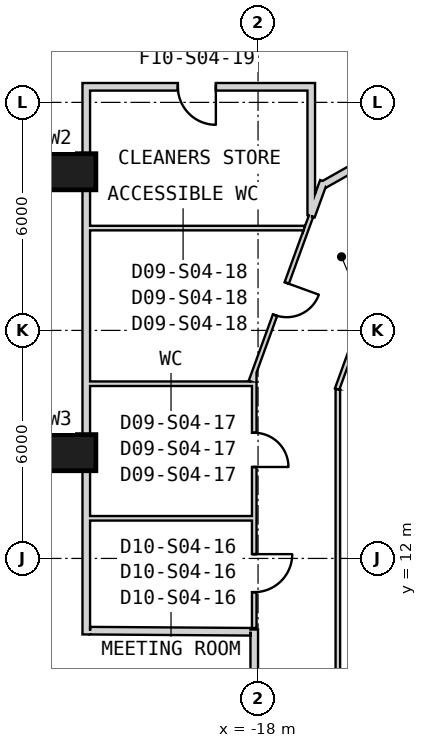
"""IFC4 building model, lengths in metres.
Left out: names, types, materials, properties, quantities, classifications, styles, units other than length and angle.
Written with IfcOpenShell. Run it as: python <this file> out.ifc"""

import sys

from ifc_helpers import new_model, si_unit, direction, frame, frame_2d, origin, origin_2d, place, context, subcontext, project, spatial, rectangle, extrude, element, fill, save


model = new_model("IFC4")
c1 = context("Model", 3, precision=1e-05, world=origin(), true_north=direction((0.0, 1.0)))
c2 = subcontext(c1, "Body", "Model", "MODEL_VIEW")
j1 = project(units=[si_unit("LENGTHUNIT", "METRE"), si_unit("PLANEANGLEUNIT", "RADIAN")], contexts=[c1])
p1 = place(None, origin())
s1 = spatial("IfcSite", under=j1, at=p1, CompositionType="ELEMENT")
p2 = place(p1, origin())
s2 = spatial("IfcBuilding", under=s1, at=p2, CompositionType="ELEMENT")
p3 = place(p2, frame((0.0, 0.0, 94.7)))
s3 = spatial("IfcBuildingStorey", under=s2, at=p3, CompositionType="ELEMENT", Elevation=94.7)
for number, where, z_axis, x_axis in (
    (1, (-23.018, 22.174, 0.0), (0.0, 0.0, 1.0), (-1.0, 0.0, 0.0)),
    (2, (-23.018, 14.783, 0.0), (0.0, 0.0, 1.0), (-1.0, 0.0, 0.0)),
):
    element("IfcColumn", number, at=place(p3, frame(where, z_axis=z_axis, x_axis=x_axis)), inside=s3, PredefinedType="COLUMN", context=c2, shape_type="SweptSolid", body=[
        extrude(rectangle(XDim=1.5, YDim=0.95, at=origin_2d()), origin(), (0.0, 0.0, 1.0), 4.1),
    ])
p4 = place(p3, frame((-10.575, 18.316, 0.0), z_axis=(0.0, 0.0, 1.0), x_axis=(-0.500006018292, 0.866021929094, 0.0)))
e3 = element("IfcWall", 3, at=p4, inside=s3, PredefinedType="SHEAR", context=c2, shape_type="SweptSolid", body=[
    extrude(rectangle(XDim=13.241, YDim=0.8, at=frame_2d((6.621, 0.0))), origin(), (0.0, 0.0, 1.0), 4.1),
])
p5 = place(p4, frame((1.9, 0.0, 0.0)))
e4 = element("IfcOpeningElement", 4, at=p5, cuts=e3, PredefinedType="OPENING", context=c2, shape_type="SweptSolid", body=[
    extrude(rectangle(XDim=1.4, YDim=2.4, at=frame_2d((0.7, 1.2))), frame((0.0, 0.41, 0.0), z_axis=(0.0, -1.0, 0.0), x_axis=(1.0, 0.0, 0.0)), (0.0, 0.0, 1.0), 0.82),
])
p6 = place(p3, frame((-14.528, 20.282, 0.0), z_axis=(0.0, 0.0, 1.0), x_axis=(-0.341969257767, -0.939711140054, 0.0)))
e5 = element("IfcWall", 5, at=p6, inside=s3, PredefinedType="PARTITIONING", context=c2, shape_type="SweptSolid", body=[
    extrude(rectangle(XDim=4.073, YDim=0.12, at=frame_2d((2.037, 0.0))), origin(), (0.0, 0.0, 1.0), 2.88),
])
p7 = place(p3, frame((-15.9, 16.451, 0.0), z_axis=(0.0, 0.0, 1.0), x_axis=(0.0, -1.0, 0.0)))
e6 = element("IfcWall", 6, at=p7, inside=s3, PredefinedType="PARTITIONING", context=c2, shape_type="SweptSolid", body=[
    extrude(rectangle(XDim=33.022, YDim=0.12, at=frame_2d((16.511, 0.0))), origin(), (0.0, 0.0, 1.0), 2.98),
])
p8 = place(p7, frame((15.981, 0.0, 0.0)))
e7 = element("IfcOpeningElement", 7, at=p8, cuts=e6, PredefinedType="OPENING", context=c2, shape_type="SweptSolid", body=[
    extrude(rectangle(XDim=1.0, YDim=2.1, at=frame_2d((0.5, 1.05))), frame((0.0, 0.07, 0.0), z_axis=(0.0, -1.0, 0.0), x_axis=(1.0, 0.0, 0.0)), (0.0, 0.0, 1.0), 0.14),
])
p9 = place(p3, frame((-18.1, 10.13, 0.0), z_axis=(0.0, 0.0, 1.0), x_axis=(0.0, -1.0, 0.0)))
e8 = element("IfcWall", 8, at=p9, inside=s3, PredefinedType="PARTITIONING", context=c2, shape_type="SweptSolid", body=[
    extrude(rectangle(XDim=20.26, YDim=0.2, at=frame_2d((10.13, 0.0))), origin(), (0.0, 0.0, 1.0), 3.08),
])
p10 = place(p9, frame((9.63, 0.0, 0.0)))
e9 = element("IfcOpeningElement", 9, at=p10, cuts=e8, PredefinedType="OPENING", context=c2, shape_type="SweptSolid", body=[
    extrude(rectangle(XDim=1.0, YDim=2.1, at=frame_2d((0.5, 1.05))), frame((0.0, 0.11, 0.0), z_axis=(0.0, -1.0, 0.0), x_axis=(1.0, 0.0, 0.0)), (0.0, 0.0, 1.0), 0.22),
])
p11 = place(p3, frame((-16.271, 21.923, 0.0), z_axis=(0.0, 0.0, 1.0), x_axis=(-0.342165073447, -0.939639857878, 0.0)))
e10 = element("IfcWall", 10, at=p11, inside=s3, PredefinedType="PARTITIONING", context=c2, shape_type="SweptSolid", body=[
    extrude(rectangle(XDim=0.975, YDim=0.2, at=frame_2d((0.488, 0.0))), origin(), (0.0, 0.0, 1.0), 2.88),
])
p12 = place(p3, frame((-13.856, 23.2, 0.0), z_axis=(0.0, 0.0, 1.0), x_axis=(-0.870639942446, -0.491920817426, 0.0)))
e11 = element("IfcWall", 11, at=p12, inside=s3, PredefinedType="PARTITIONING", context=c2, shape_type="SweptSolid", body=[
    extrude(rectangle(XDim=2.771, YDim=0.2, at=frame_2d((1.386, 0.0))), origin(), (0.0, 0.0, 1.0), 3.8),
])
p13 = place(p3, frame((-18.1, 16.899, 0.0), z_axis=(0.0, 0.0, 1.0), x_axis=(0.0, -1.0, 0.0)))
e12 = element("IfcWall", 12, at=p13, inside=s3, PredefinedType="PARTITIONING", context=c2, shape_type="SweptSolid", body=[
    extrude(rectangle(XDim=6.729, YDim=0.12, at=frame_2d((3.365, 0.0))), origin(), (0.0, 0.0, 1.0), 3.08),
])
p14 = place(p13, frame((4.786, 0.0, 0.0)))
e13 = element("IfcOpeningElement", 13, at=p14, cuts=e12, PredefinedType="OPENING", context=c2, shape_type="SweptSolid", body=[
    extrude(rectangle(XDim=1.0, YDim=2.1, at=frame_2d((0.5, 1.05))), frame((0.0, 0.07, 0.0), z_axis=(0.0, -1.0, 0.0), x_axis=(1.0, 0.0, 0.0)), (0.0, 0.0, 1.0), 0.14),
])
p15 = place(p13, frame((1.593, 0.0, 0.0)))
e14 = element("IfcOpeningElement", 14, at=p15, cuts=e12, PredefinedType="OPENING", context=c2, shape_type="SweptSolid", body=[
    extrude(rectangle(XDim=0.9, YDim=2.1, at=frame_2d((0.45, 1.05))), frame((0.0, 0.07, 0.0), z_axis=(0.0, -1.0, 0.0), x_axis=(1.0, 0.0, 0.0)), (0.0, 0.0, 1.0), 0.14),
])
p16 = place(p3, frame((-16.605, 21.006, 0.0), z_axis=(0.0, 0.0, 1.0), x_axis=(-0.342014101174, -0.939694819927, 0.0)))
e15 = element("IfcWall", 15, at=p16, inside=s3, PredefinedType="PARTITIONING", context=c2, shape_type="SweptSolid", body=[
    extrude(rectangle(XDim=4.628, YDim=0.12, at=frame_2d((2.314, 0.0))), origin(), (0.0, 0.0, 1.0), 2.98),
])
p17 = place(p16, frame((1.871, 0.0, 0.0)))
e16 = element("IfcOpeningElement", 16, at=p17, cuts=e15, PredefinedType="OPENING", context=c2, shape_type="SweptSolid", body=[
    extrude(rectangle(XDim=0.9, YDim=2.1, at=frame_2d((0.45, 1.05))), frame((0.0, 0.07, 0.0), z_axis=(0.0, -1.0, 0.0), x_axis=(1.0, 0.0, 0.0)), (0.0, 0.0, 1.0), 0.14),
])
p18 = place(p3, frame((-22.52, 10.0, 0.0), z_axis=(0.0, 0.0, 1.0), x_axis=(0.0, 1.0, 0.0)))
e17 = element("IfcWall", 17, at=p18, inside=s3, PredefinedType="PARTITIONING", context=c2, shape_type="SweptSolid", body=[
    extrude(rectangle(XDim=6.597, YDim=0.2, at=frame_2d((3.298, 0.0))), origin(), (0.0, 0.0, 1.0), 3.8),
])
p19 = place(p3, frame((-22.52, 16.597, 0.0), z_axis=(0.0, 0.0, 1.0), x_axis=(0.0, 1.0, 0.0)))
e18 = element("IfcWall", 18, at=p19, inside=s3, PredefinedType="PARTITIONING", context=c2, shape_type="SweptSolid", body=[
    extrude(rectangle(XDim=4.095, YDim=0.2, at=frame_2d((2.048, 0.0))), origin(), (0.0, 0.0, 1.0), 3.8),
])
p20 = place(p3, frame((-22.52, 20.692, 0.0), z_axis=(0.0, 0.0, 1.0), x_axis=(0.0, 1.0, 0.0)))
e19 = element("IfcWall", 19, at=p20, inside=s3, PredefinedType="PARTITIONING", context=c2, shape_type="SweptSolid", body=[
    extrude(rectangle(XDim=3.618, YDim=0.2, at=frame_2d((1.809, 0.0))), origin(), (0.0, 0.0, 1.0), 2.98),
])
p21 = place(p3, frame((-18.2, 10.071, 0.0), z_axis=(0.0, 0.0, 1.0), x_axis=(-0.999977091955, 0.006768719685, 0.0)))
e20 = element("IfcWall", 20, at=p21, inside=s3, PredefinedType="PARTITIONING", context=c2, shape_type="SweptSolid", body=[
    extrude(rectangle(XDim=4.22, YDim=0.2, at=frame_2d((2.11, 0.0))), origin(), (0.0, 0.0, 1.0), 3.8),
])
p22 = place(p3, frame((-16.6, 21.036, 0.0), z_axis=(0.0, 0.0, 1.0), x_axis=(0.0, 1.0, 0.0)))
e21 = element("IfcWall", 21, at=p22, inside=s3, PredefinedType="PARTITIONING", context=c2, shape_type="SweptSolid", body=[
    extrude(rectangle(XDim=3.474, YDim=0.2, at=frame_2d((1.737, 0.0))), origin(), (0.0, 0.0, 1.0), 2.88),
])
p23 = place(p3, frame((-16.7, 24.41, 0.0), z_axis=(0.0, 0.0, 1.0), x_axis=(-1.0, 0.0, 0.0)))
e22 = element("IfcWall", 22, at=p23, inside=s3, PredefinedType="PARTITIONING", context=c2, shape_type="SweptSolid", body=[
    extrude(rectangle(XDim=5.92, YDim=0.2, at=frame_2d((2.96, 0.0))), origin(), (0.0, 0.0, 1.0), 2.88),
])
p24 = place(p23, frame((2.41, 0.0, 0.0)))
e23 = element("IfcOpeningElement", 23, at=p24, cuts=e22, PredefinedType="OPENING", context=c2, shape_type="SweptSolid", body=[
    extrude(rectangle(XDim=1.0, YDim=2.1, at=frame_2d((0.5, 1.05))), frame((0.0, 0.11, 0.0), z_axis=(0.0, -1.0, 0.0), x_axis=(1.0, 0.0, 0.0)), (0.0, 0.0, 1.0), 0.22),
])
p25 = place(p3, frame((-22.42, 13.056, 0.0), z_axis=(0.0, 0.0, 1.0), x_axis=(1.0, 0.0, 0.0)))
e24 = element("IfcWall", 24, at=p25, inside=s3, PredefinedType="PARTITIONING", context=c2, shape_type="SweptSolid", body=[
    extrude(rectangle(XDim=4.26, YDim=0.12, at=frame_2d((2.13, 0.0))), origin(), (0.0, 0.0, 1.0), 3.08),
])
p26 = place(p3, frame((-22.42, 16.597, 0.0), z_axis=(0.0, 0.0, 1.0), x_axis=(1.0, 0.0, 0.0)))
e25 = element("IfcWall", 25, at=p26, inside=s3, PredefinedType="PARTITIONING", context=c2, shape_type="SweptSolid", body=[
    extrude(rectangle(XDim=4.26, YDim=0.12, at=frame_2d((2.13, 0.0))), origin(), (0.0, 0.0, 1.0), 3.8),
])
p27 = place(p3, frame((-22.42, 20.692, 0.0), z_axis=(0.0, 0.0, 1.0), x_axis=(1.0, 0.0, 0.0)))
e26 = element("IfcWall", 26, at=p27, inside=s3, PredefinedType="PARTITIONING", context=c2, shape_type="SweptSolid", body=[
    extrude(rectangle(XDim=5.637, YDim=0.12, at=frame_2d((2.818, 0.0))), origin(), (0.0, 0.0, 1.0), 2.98),
])
p28 = place(p14, origin())
e27 = element("IfcDoor", 27, at=p28, inside=s3, OperationType="SINGLE_SWING_LEFT", PredefinedType="NOTDEFINED", context=c2, shape_type="SweptSolid", body=[
    extrude(rectangle(XDim=1.0, YDim=2.1, at=frame_2d((0.5, 1.05))), frame((0.0, 0.025, 0.0), z_axis=(0.0, -1.0, 0.0), x_axis=(1.0, 0.0, 0.0)), (0.0, 0.0, 1.0), 0.05),
])
fill(e13, e27)
p29 = place(p15, origin())
e28 = element("IfcDoor", 28, at=p29, inside=s3, OperationType="SINGLE_SWING_RIGHT", PredefinedType="NOTDEFINED", context=c2, shape_type="SweptSolid", body=[
    extrude(rectangle(XDim=0.9, YDim=2.1, at=frame_2d((0.45, 1.05))), frame((0.0, 0.025, 0.0), z_axis=(0.0, -1.0, 0.0), x_axis=(1.0, 0.0, 0.0)), (0.0, 0.0, 1.0), 0.05),
])
fill(e14, e28)
p30 = place(p17, origin())
e29 = element("IfcDoor", 29, at=p30, inside=s3, OperationType="SINGLE_SWING_LEFT", PredefinedType="NOTDEFINED", context=c2, shape_type="SweptSolid", body=[
    extrude(rectangle(XDim=0.9, YDim=2.1, at=frame_2d((0.45, 1.05))), frame((0.0, 0.025, 0.0), z_axis=(0.0, -1.0, 0.0), x_axis=(1.0, 0.0, 0.0)), (0.0, 0.0, 1.0), 0.05),
])
fill(e16, e29)
p31 = place(p24, origin())
e30 = element("IfcDoor", 30, at=p31, inside=s3, OperationType="SINGLE_SWING_LEFT", PredefinedType="USERDEFINED", context=c2, shape_type="SweptSolid", body=[
    extrude(rectangle(XDim=1.0, YDim=2.1, at=frame_2d((0.5, 1.05))), frame((0.0, 0.025, 0.0), z_axis=(0.0, -1.0, 0.0), x_axis=(1.0, 0.0, 0.0)), (0.0, 0.0, 1.0), 0.05),
])
fill(e23, e30)
save(model, sys.argv[1])
